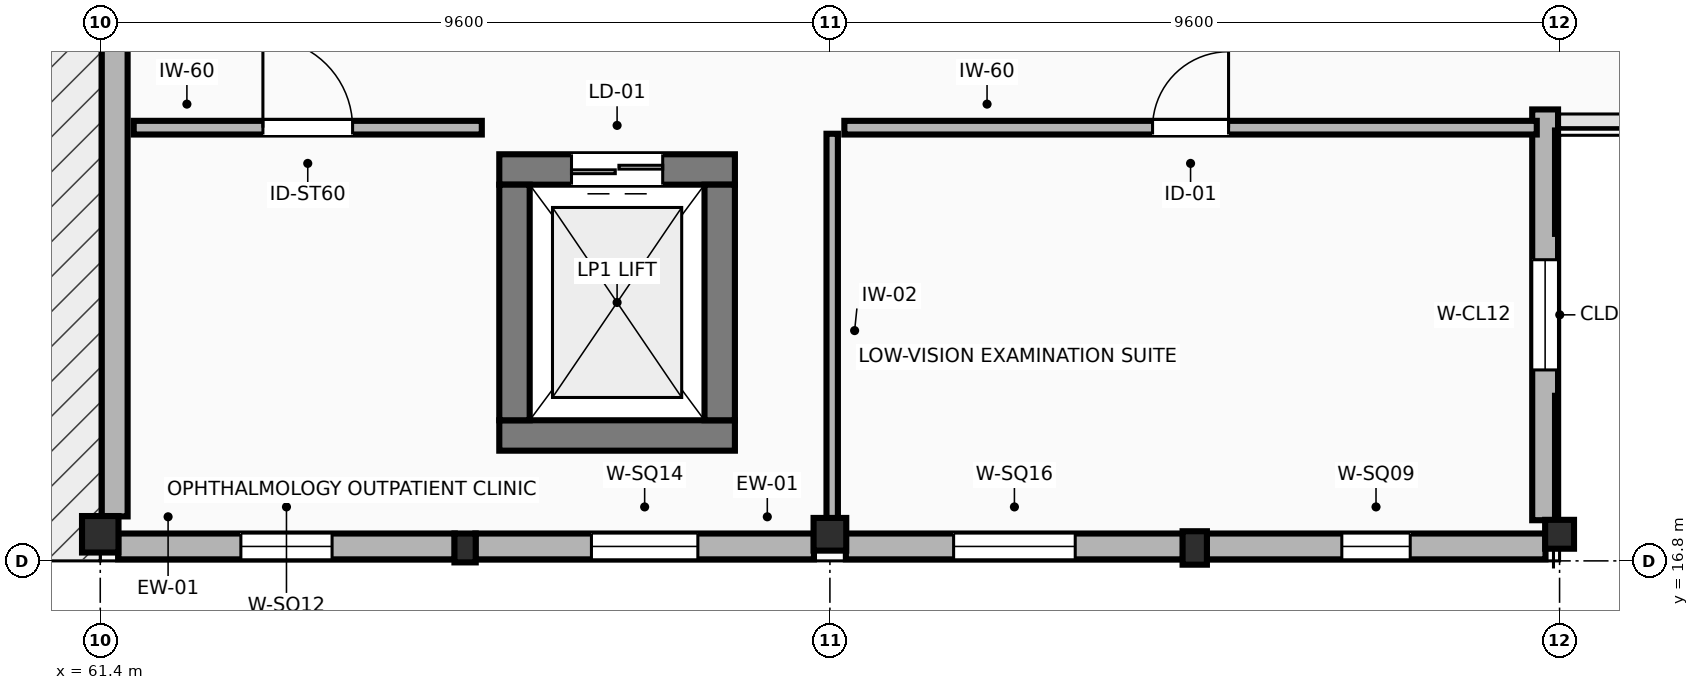
"""IFC4 building model, lengths in metres.
Left out: names, types, materials, properties, quantities, classifications, styles, units other than length and angle.
Written with IfcOpenShell. Run it as: python <this file> out.ifc"""

import sys

from ifc_helpers import new_model, si_unit, direction, frame, frame_2d, origin, origin_2d, place, context, subcontext, project, spatial, rectangle, extrude, element, fill, save


model = new_model("IFC4")
c1 = context("Model", 3, precision=1e-05, world=origin(), true_north=direction((0.0, 1.0)))
c2 = subcontext(c1, "Body", "Model", "MODEL_VIEW")
j1 = project(units=[si_unit("LENGTHUNIT", "METRE"), si_unit("PLANEANGLEUNIT", "RADIAN")], contexts=[c1])
p1 = place(None, origin())
s1 = spatial("IfcSite", under=j1, at=p1, CompositionType="ELEMENT")
p2 = place(p1, origin())
s2 = spatial("IfcBuilding", under=s1, at=p2, CompositionType="ELEMENT")
p3 = place(p2, frame((0.0, 0.0, 13.8)))
s3 = spatial("IfcBuildingStorey", under=s2, at=p3, CompositionType="ELEMENT", Elevation=13.8)
p4 = place(p3, frame((61.4, 17.15, 0.0), z_axis=(0.0, 0.0, 1.0), x_axis=(1.0, 0.0, 0.0)))
e1 = element("IfcColumn", 1, at=p4, inside=s3, PredefinedType="COLUMN", context=c2, shape_type="SweptSolid", body=[
    extrude(rectangle(XDim=0.48, YDim=0.48, at=origin_2d()), origin(), (0.0, 0.0, 1.0), 4.2),
])
p5 = place(p3, frame((71.0, 17.15, 0.0), z_axis=(0.0, 0.0, 1.0), x_axis=(1.0, 0.0, 0.0)))
e2 = element("IfcColumn", 2, at=p5, inside=s3, PredefinedType="COLUMN", context=c2, shape_type="SweptSolid", body=[
    extrude(rectangle(XDim=0.43, YDim=0.43, at=origin_2d()), origin(), (0.0, 0.0, 1.0), 4.2),
])
p6 = place(p3, frame((80.6, 17.15, 0.0), z_axis=(0.0, 0.0, 1.0), x_axis=(1.0, 0.0, 0.0)))
e3 = element("IfcColumn", 3, at=p6, inside=s3, PredefinedType="COLUMN", context=c2, shape_type="SweptSolid", body=[
    extrude(rectangle(XDim=0.38, YDim=0.38, at=origin_2d()), origin(), (0.0, 0.0, 1.0), 4.2),
])
p7 = place(p3, frame((66.2, 16.97, 0.0), z_axis=(0.0, 0.0, 1.0), x_axis=(1.0, 0.0, 0.0)))
e4 = element("IfcColumn", 4, at=p7, inside=s3, PredefinedType="PILASTER", context=c2, shape_type="SweptSolid", body=[
    extrude(rectangle(XDim=0.28, YDim=0.38, at=origin_2d()), origin(), (0.0, 0.0, 1.0), 4.2),
])
p8 = place(p3, frame((75.8, 16.97, 0.0), z_axis=(0.0, 0.0, 1.0), x_axis=(1.0, 0.0, 0.0)))
e5 = element("IfcColumn", 5, at=p8, inside=s3, PredefinedType="PILASTER", context=c2, shape_type="SweptSolid", body=[
    extrude(rectangle(XDim=0.32, YDim=0.44, at=origin_2d()), origin(), (0.0, 0.0, 1.0), 4.2),
])
p9 = place(p3, frame((61.635, 16.99, 0.0), z_axis=(0.0, 0.0, 1.0), x_axis=(1.0, 0.0, 0.0)))
e6 = element("IfcWall", 6, at=p9, inside=s3, PredefinedType="STANDARD", context=c2, shape_type="SweptSolid", body=[
    extrude(rectangle(XDim=4.43, YDim=0.34, at=frame_2d((2.215, 0.0))), origin(), (0.0, 0.0, 1.0), 3.185),
])
p10 = place(p9, frame((1.615, 0.0, 1.35)))
e7 = element("IfcOpeningElement", 7, at=p10, cuts=e6, PredefinedType="OPENING", context=c2, shape_type="SweptSolid", body=[
    extrude(rectangle(XDim=1.2, YDim=1.2, at=frame_2d((0.6, 0.6))), frame((0.0, 0.18, 0.0), z_axis=(0.0, -1.0, 0.0), x_axis=(1.0, 0.0, 0.0)), (0.0, 0.0, 1.0), 0.36),
])
p11 = place(p3, frame((66.335, 16.99, 0.0), z_axis=(0.0, 0.0, 1.0), x_axis=(1.0, 0.0, 0.0)))
e8 = element("IfcWall", 8, at=p11, inside=s3, PredefinedType="STANDARD", context=c2, shape_type="SweptSolid", body=[
    extrude(rectangle(XDim=4.455, YDim=0.34, at=frame_2d((2.228, 0.0))), origin(), (0.0, 0.0, 1.0), 3.185),
])
p12 = place(p11, frame((1.528, 0.0, 1.35)))
e9 = element("IfcOpeningElement", 9, at=p12, cuts=e8, PredefinedType="OPENING", context=c2, shape_type="SweptSolid", body=[
    extrude(rectangle(XDim=1.4, YDim=1.4, at=frame_2d((0.7, 0.7))), frame((0.0, 0.18, 0.0), z_axis=(0.0, -1.0, 0.0), x_axis=(1.0, 0.0, 0.0)), (0.0, 0.0, 1.0), 0.36),
])
p13 = place(p3, frame((71.21, 16.99, 0.0), z_axis=(0.0, 0.0, 1.0), x_axis=(1.0, 0.0, 0.0)))
e10 = element("IfcWall", 10, at=p13, inside=s3, PredefinedType="STANDARD", context=c2, shape_type="SweptSolid", body=[
    extrude(rectangle(XDim=4.435, YDim=0.34, at=frame_2d((2.218, 0.0))), origin(), (0.0, 0.0, 1.0), 3.185),
])
p14 = place(p13, frame((1.417, 0.0, 0.95)))
e11 = element("IfcOpeningElement", 11, at=p14, cuts=e10, PredefinedType="OPENING", context=c2, shape_type="SweptSolid", body=[
    extrude(rectangle(XDim=1.6, YDim=1.6, at=frame_2d((0.8, 0.8))), frame((0.0, 0.18, 0.0), z_axis=(0.0, -1.0, 0.0), x_axis=(1.0, 0.0, 0.0)), (0.0, 0.0, 1.0), 0.36),
])
p15 = place(p3, frame((75.955, 16.99, 0.0), z_axis=(0.0, 0.0, 1.0), x_axis=(1.0, 0.0, 0.0)))
e12 = element("IfcWall", 12, at=p15, inside=s3, PredefinedType="STANDARD", context=c2, shape_type="SweptSolid", body=[
    extrude(rectangle(XDim=4.46, YDim=0.34, at=frame_2d((2.23, 0.0))), origin(), (0.0, 0.0, 1.0), 3.185),
])
p16 = place(p15, frame((1.78, 0.0, 0.95)))
e13 = element("IfcOpeningElement", 13, at=p16, cuts=e12, PredefinedType="OPENING", context=c2, shape_type="SweptSolid", body=[
    extrude(rectangle(XDim=0.9, YDim=0.9, at=frame_2d((0.45, 0.45))), frame((0.0, 0.18, 0.0), z_axis=(0.0, -1.0, 0.0), x_axis=(1.0, 0.0, 0.0)), (0.0, 0.0, 1.0), 0.36),
])
p17 = place(p3, frame((80.41, 17.335, 0.0), z_axis=(0.0, 0.0, 1.0), x_axis=(0.0, 1.0, 0.0)))
e14 = element("IfcWall", 14, at=p17, inside=s3, PredefinedType="STANDARD", context=c2, shape_type="SweptSolid", body=[
    extrude(rectangle(XDim=5.405, YDim=0.34, at=frame_2d((2.703, 0.0))), origin(), (0.0, 0.0, 1.0), 3.335),
])
p18 = place(p17, frame((1.978, 0.0, 0.95)))
e15 = element("IfcOpeningElement", 15, at=p18, cuts=e14, PredefinedType="OPENING", context=c2, shape_type="SweptSolid", body=[
    extrude(rectangle(XDim=1.45, YDim=1.7, at=frame_2d((0.725, 0.85))), frame((0.0, 0.18, 0.0), z_axis=(0.0, -1.0, 0.0), x_axis=(1.0, 0.0, 0.0)), (0.0, 0.0, 1.0), 0.36),
])
p19 = place(p3, frame((61.59, 25.605, 0.0), z_axis=(0.0, 0.0, 1.0), x_axis=(0.0, -1.0, 0.0)))
e16 = element("IfcWall", 16, at=p19, inside=s3, PredefinedType="STANDARD", context=c2, shape_type="SweptSolid", body=[
    extrude(rectangle(XDim=8.22, YDim=0.34, at=frame_2d((4.11, 0.0))), origin(), (0.0, 0.0, 1.0), 2.965),
])
p20 = place(p3, frame((66.65, 18.45, 0.0), z_axis=(0.0, 0.0, 1.0), x_axis=(1.0, 0.0, 0.0)))
e17 = element("IfcWall", 17, at=p20, inside=s3, PredefinedType="SHEAR", context=c2, shape_type="SweptSolid", body=[
    extrude(rectangle(XDim=3.1, YDim=0.4, at=frame_2d((1.55, 0.0))), origin(), (0.0, 0.0, 1.0), 4.2),
])
p21 = place(p3, frame((69.75, 21.95, 0.0), z_axis=(0.0, 0.0, 1.0), x_axis=(-1.0, 0.0, 0.0)))
e18 = element("IfcWall", 18, at=p21, inside=s3, PredefinedType="SHEAR", context=c2, shape_type="SweptSolid", body=[
    extrude(rectangle(XDim=3.1, YDim=0.4, at=frame_2d((1.55, 0.0))), origin(), (0.0, 0.0, 1.0), 4.2),
])
p22 = place(p21, frame((0.95, 0.0, 0.0)))
e19 = element("IfcOpeningElement", 19, at=p22, cuts=e18, PredefinedType="OPENING", context=c2, shape_type="SweptSolid", body=[
    extrude(rectangle(XDim=1.2, YDim=2.2, at=frame_2d((0.6, 1.1))), frame((0.0, 0.21, 0.0), z_axis=(0.0, -1.0, 0.0), x_axis=(1.0, 0.0, 0.0)), (0.0, 0.0, 1.0), 0.42),
])
for number, where, z_axis, x_axis in (
    (20, (66.85, 18.65, 0.0), (0.0, 0.0, 1.0), (0.0, 1.0, 0.0)),
    (21, (69.55, 21.75, 0.0), (0.0, 0.0, 1.0), (0.0, -1.0, 0.0)),
):
    element("IfcWall", number, at=place(p3, frame(where, z_axis=z_axis, x_axis=x_axis)), inside=s3, PredefinedType="SHEAR", context=c2, shape_type="SweptSolid", body=[
        extrude(rectangle(XDim=3.1, YDim=0.4, at=frame_2d((1.55, 0.0))), origin(), (0.0, 0.0, 1.0), 4.2),
    ])
p23 = place(p3, frame((61.84, 22.5, 0.0), z_axis=(0.0, 0.0, 1.0), x_axis=(1.0, 0.0, 0.0)))
e22 = element("IfcWall", 22, at=p23, inside=s3, PredefinedType="PARTITIONING", context=c2, shape_type="SweptSolid", body=[
    extrude(rectangle(XDim=4.58, YDim=0.18, at=frame_2d((2.29, 0.0))), origin(), (0.0, 0.0, 1.0), 3.92),
])
p24 = place(p23, frame((1.7, 0.0, 0.0)))
e23 = element("IfcOpeningElement", 23, at=p24, cuts=e22, PredefinedType="OPENING", context=c2, shape_type="SweptSolid", body=[
    extrude(rectangle(XDim=1.18, YDim=2.18, at=frame_2d((0.59, 1.09))), frame((0.0, 0.1, 0.0), z_axis=(0.0, -1.0, 0.0), x_axis=(1.0, 0.0, 0.0)), (0.0, 0.0, 1.0), 0.2),
])
p25 = place(p3, frame((71.03, 22.42, 0.0), z_axis=(0.0, 0.0, 1.0), x_axis=(0.0, -1.0, 0.0)))
e24 = element("IfcWall", 24, at=p25, inside=s3, PredefinedType="PARTITIONING", context=c2, shape_type="SweptSolid", body=[
    extrude(rectangle(XDim=5.18, YDim=0.15, at=frame_2d((2.59, 0.0))), origin(), (0.0, 0.0, 1.0), 3.405),
])
p26 = place(p3, frame((71.19, 22.5, 0.0), z_axis=(0.0, 0.0, 1.0), x_axis=(1.0, 0.0, 0.0)))
e25 = element("IfcWall", 25, at=p26, inside=s3, PredefinedType="PARTITIONING", context=c2, shape_type="SweptSolid", body=[
    extrude(rectangle(XDim=9.11, YDim=0.18, at=frame_2d((4.555, 0.0))), origin(), (0.0, 0.0, 1.0), 3.92),
])
p27 = place(p26, frame((4.055, 0.0, 0.0)))
e26 = element("IfcOpeningElement", 26, at=p27, cuts=e25, PredefinedType="OPENING", context=c2, shape_type="SweptSolid", body=[
    extrude(rectangle(XDim=1.0, YDim=2.15, at=frame_2d((0.5, 1.075))), frame((0.0, 0.1, 0.0), z_axis=(0.0, -1.0, 0.0), x_axis=(1.0, 0.0, 0.0)), (0.0, 0.0, 1.0), 0.2),
])
p28 = place(p10, origin())
e27 = element("IfcWindow", 27, at=p28, inside=s3, PartitioningType="SINGLE_PANEL", PredefinedType="WINDOW", context=c2, shape_type="SweptSolid", body=[
    extrude(rectangle(XDim=1.2, YDim=1.2, at=frame_2d((0.6, 0.6))), frame((0.0, 0.03, 0.0), z_axis=(0.0, -1.0, 0.0), x_axis=(1.0, 0.0, 0.0)), (0.0, 0.0, 1.0), 0.06),
])
fill(e7, e27)
p29 = place(p12, origin())
e28 = element("IfcWindow", 28, at=p29, inside=s3, PartitioningType="SINGLE_PANEL", PredefinedType="WINDOW", context=c2, shape_type="SweptSolid", body=[
    extrude(rectangle(XDim=1.4, YDim=1.4, at=frame_2d((0.7, 0.7))), frame((0.0, 0.03, 0.0), z_axis=(0.0, -1.0, 0.0), x_axis=(1.0, 0.0, 0.0)), (0.0, 0.0, 1.0), 0.06),
])
fill(e9, e28)
p30 = place(p14, origin())
e29 = element("IfcWindow", 29, at=p30, inside=s3, PartitioningType="SINGLE_PANEL", PredefinedType="WINDOW", context=c2, shape_type="SweptSolid", body=[
    extrude(rectangle(XDim=1.6, YDim=1.6, at=frame_2d((0.8, 0.8))), frame((0.0, 0.03, 0.0), z_axis=(0.0, -1.0, 0.0), x_axis=(1.0, 0.0, 0.0)), (0.0, 0.0, 1.0), 0.06),
])
fill(e11, e29)
p31 = place(p16, origin())
e30 = element("IfcWindow", 30, at=p31, inside=s3, PartitioningType="SINGLE_PANEL", PredefinedType="WINDOW", context=c2, shape_type="SweptSolid", body=[
    extrude(rectangle(XDim=0.9, YDim=0.9, at=frame_2d((0.45, 0.45))), frame((0.0, 0.03, 0.0), z_axis=(0.0, -1.0, 0.0), x_axis=(1.0, 0.0, 0.0)), (0.0, 0.0, 1.0), 0.06),
])
fill(e13, e30)
p32 = place(p18, origin())
e31 = element("IfcWindow", 31, at=p32, inside=s3, PartitioningType="SINGLE_PANEL", PredefinedType="WINDOW", context=c2, shape_type="SweptSolid", body=[
    extrude(rectangle(XDim=1.45, YDim=1.7, at=frame_2d((0.725, 0.85))), frame((0.0, 0.03, 0.0), z_axis=(0.0, -1.0, 0.0), x_axis=(1.0, 0.0, 0.0)), (0.0, 0.0, 1.0), 0.06),
])
fill(e15, e31)
p33 = place(p22, origin())
e32 = element("IfcDoor", 32, at=p33, inside=s3, OperationType="DOUBLE_DOOR_SLIDING", PredefinedType="DOOR", context=c2, shape_type="SweptSolid", body=[
    extrude(rectangle(XDim=1.2, YDim=2.2, at=frame_2d((0.6, 1.1))), frame((0.0, 0.025, 0.0), z_axis=(0.0, -1.0, 0.0), x_axis=(1.0, 0.0, 0.0)), (0.0, 0.0, 1.0), 0.05),
])
fill(e19, e32)
p34 = place(p24, origin())
e33 = element("IfcDoor", 33, at=p34, inside=s3, OperationType="SINGLE_SWING_LEFT", PredefinedType="DOOR", context=c2, shape_type="SweptSolid", body=[
    extrude(rectangle(XDim=1.18, YDim=2.18, at=frame_2d((0.59, 1.09))), frame((0.0, 0.025, 0.0), z_axis=(0.0, -1.0, 0.0), x_axis=(1.0, 0.0, 0.0)), (0.0, 0.0, 1.0), 0.05),
])
fill(e23, e33)
p35 = place(p27, origin())
e34 = element("IfcDoor", 34, at=p35, inside=s3, OperationType="SINGLE_SWING_RIGHT", PredefinedType="DOOR", context=c2, shape_type="SweptSolid", body=[
    extrude(rectangle(XDim=1.0, YDim=2.15, at=frame_2d((0.5, 1.075))), frame((0.0, 0.025, 0.0), z_axis=(0.0, -1.0, 0.0), x_axis=(1.0, 0.0, 0.0)), (0.0, 0.0, 1.0), 0.05),
])
fill(e26, e34)
save(model, sys.argv[1])
